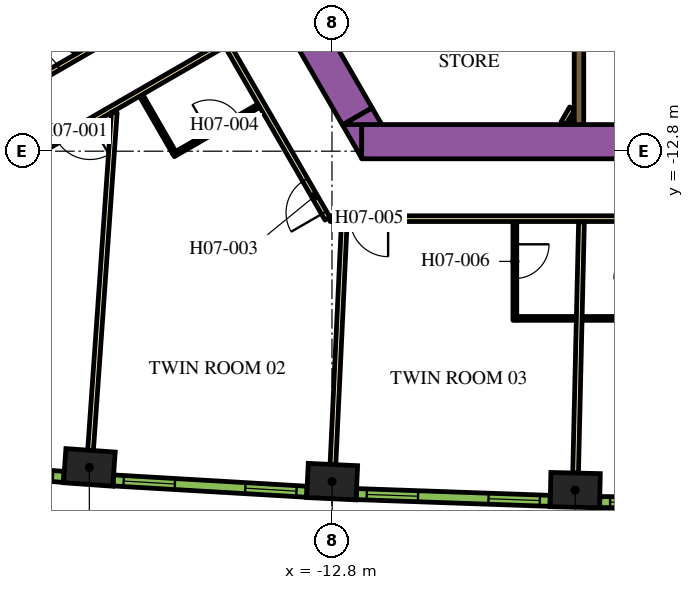
"""IFC4 building model, lengths in metres.
Left out: names, types, materials, properties, quantities, classifications, styles, units other than length and angle.
Written with IfcOpenShell. Run it as: python <this file> out.ifc"""

import sys

from ifc_helpers import new_model, si_unit, direction, frame, frame_2d, origin, origin_2d, place, context, subcontext, project, spatial, polyline, rectangle, outline, extrude, element, fill, save


model = new_model("IFC4")
c1 = context("Model", 3, precision=1e-05, world=origin(), true_north=direction((0.0, 1.0)))
c2 = subcontext(c1, "Body", "Model", "MODEL_VIEW")
j1 = project(units=[si_unit("LENGTHUNIT", "METRE"), si_unit("PLANEANGLEUNIT", "RADIAN")], contexts=[c1])
p1 = place(None, origin())
s1 = spatial("IfcSite", under=j1, at=p1, CompositionType="ELEMENT")
p2 = place(p1, origin())
s2 = spatial("IfcBuilding", under=s1, at=p2, CompositionType="ELEMENT")
p3 = place(p2, frame((0.0, 0.0, 95.4)))
s3 = spatial("IfcBuildingStorey", under=s2, at=p3, CompositionType="ELEMENT", Elevation=95.4)
for number, where, z_axis, x_axis in (
    (1, (-19.184, -21.12, 0.0), (0.0, 0.0, 1.0), (0.998, -0.07, 0.0)),
    (2, (-12.795, -21.494, 0.0), (0.0, 0.0, 1.0), (0.999, -0.047, 0.0)),
    (3, (-6.399, -21.719, 0.0), (0.0, 0.0, 1.0), (1.0, -0.023, 0.0)),
):
    element("IfcColumn", number, at=place(p3, frame(where, z_axis=z_axis, x_axis=x_axis)), inside=s3, PredefinedType="COLUMN", context=c2, shape_type="SweptSolid", body=[
        extrude(rectangle(XDim=1.3, YDim=0.9, at=origin_2d()), origin(), (0.0, 0.0, 1.0), 3.9),
    ])
p4 = place(p3, frame((-12.019, -12.55, 0.0), z_axis=(0.0, 0.0, 1.0), x_axis=(1.0, 0.0, 0.0)))
e4 = element("IfcWall", 4, at=p4, inside=s3, PredefinedType="SOLIDWALL", context=c2, shape_type="SweptSolid", body=[
    extrude(rectangle(XDim=21.63, YDim=0.9, at=frame_2d((10.815, 0.0))), origin(), (0.0, 0.0, 1.0), 3.9),
])
p5 = place(p3, origin())
e5 = element("IfcWall", 5, at=p5, inside=s3, PredefinedType="SOLIDWALL", context=c2, shape_type="SweptSolid", body=[
    extrude(outline(polyline([(-12.529, -12.1), (-12.021, -12.1), (-12.021, -12.98), (-12.529, -12.1)])), origin(), (0.0, 0.0, 1.0), 3.9),
])
p6 = place(p3, frame((-12.134, -11.883, 0.0), z_axis=(0.0, 0.0, 1.0), x_axis=(-0.500005339912, 0.866022320763, 0.0)))
e6 = element("IfcWall", 6, at=p6, inside=s3, PredefinedType="SOLIDWALL", context=c2, shape_type="SweptSolid", body=[
    extrude(rectangle(XDim=9.488, YDim=0.9, at=frame_2d((4.744, 0.0))), origin(), (0.0, 0.0, 1.0), 3.9),
])
e7 = element("IfcWall", 7, at=p5, inside=s3, PredefinedType="SOLIDWALL", context=c2, shape_type="SweptSolid", body=[
    extrude(outline(polyline([(-11.489, -12.1), (-12.505, -12.1), (-11.743, -11.66), (-11.489, -12.1)])), origin(), (0.0, 0.0, 1.0), 3.9),
])
p7 = place(p3, frame((-6.3, -12.1, 0.0), z_axis=(0.0, 0.0, 1.0), x_axis=(0.0, 1.0, 0.0)))
e8 = element("IfcWall", 8, at=p7, inside=s3, PredefinedType="SOLIDWALL", context=c2, shape_type="SweptSolid", body=[
    extrude(rectangle(XDim=3.146, YDim=0.25, at=frame_2d((1.573, 0.0))), origin(), (0.0, 0.0, 1.0), 3.9),
])
p8 = place(p3, frame((-6.708, -12.068, 0.0), z_axis=(0.0, 0.0, 1.0), x_axis=(0.500000789788, 0.8660249478, 0.0)))
e9 = element("IfcWall", 9, at=p8, inside=s3, PredefinedType="PARTITIONING", context=c2, shape_type="SweptSolid", body=[
    extrude(rectangle(XDim=0.456, YDim=0.15, at=frame_2d((0.228, 0.0))), origin(), (0.0, 0.0, 1.0), 2.75),
])
p9 = place(p3, frame((-6.534, -12.068, 0.0), z_axis=(0.0, 0.0, 1.0), x_axis=(0.500240224089, 0.865886665912, 0.0)))
e10 = element("IfcWall", 10, at=p9, inside=s3, PredefinedType="PARTITIONING", context=c2, shape_type="SweptSolid", body=[
    extrude(rectangle(XDim=0.109, YDim=0.15, at=frame_2d((0.054, 0.0))), origin(), (0.0, 0.0, 1.0), 2.75),
])
p10 = place(p3, frame((-28.211, -15.335, 0.0), z_axis=(0.0, 0.0, 1.0), x_axis=(0.866025884867, 0.49999916674, 0.0)))
e11 = element("IfcWall", 11, at=p10, inside=s3, PredefinedType="PARTITIONING", context=c2, shape_type="SweptSolid", body=[
    extrude(rectangle(XDim=13.543, YDim=0.15, at=frame_2d((6.772, 0.0))), origin(), (0.0, 0.0, 1.0), 2.75),
])
p11 = place(p10, frame((8.488, 0.0, 0.0)))
e12 = element("IfcOpeningElement", 12, at=p11, cuts=e11, PredefinedType="OPENING", context=c2, shape_type="SweptSolid", body=[
    extrude(rectangle(XDim=1.0, YDim=2.1, at=frame_2d((0.5, 1.05))), frame((0.0, 0.085, 0.0), z_axis=(0.0, -1.0, 0.0), x_axis=(1.0, 0.0, 0.0)), (0.0, 0.0, 1.0), 0.17),
])
p12 = place(p3, frame((-15.587, -9.952, 0.0), z_axis=(0.0, 0.0, 1.0), x_axis=(-0.866017869832, -0.500013048961, 0.0)))
e13 = element("IfcWall", 13, at=p12, inside=s3, PredefinedType="PARTITIONING", context=c2, shape_type="SweptSolid", body=[
    extrude(rectangle(XDim=13.624, YDim=0.15, at=frame_2d((6.812, 0.0))), origin(), (0.0, 0.0, 1.0), 2.75),
])
p13 = place(p12, frame((4.134, 0.0, 0.0)))
e14 = element("IfcOpeningElement", 14, at=p13, cuts=e13, PredefinedType="OPENING", context=c2, shape_type="SweptSolid", body=[
    extrude(rectangle(XDim=1.0, YDim=2.1, at=frame_2d((0.5, 1.05))), frame((0.0, 0.085, 0.0), z_axis=(0.0, -1.0, 0.0), x_axis=(1.0, 0.0, 0.0)), (0.0, 0.0, 1.0), 0.17),
])
p14 = place(p3, frame((-12.918, -14.575, 0.0), z_axis=(0.0, 0.0, 1.0), x_axis=(-0.500009150678, 0.866020120573, 0.0)))
e15 = element("IfcWall", 15, at=p14, inside=s3, PredefinedType="PARTITIONING", context=c2, shape_type="SweptSolid", body=[
    extrude(rectangle(XDim=5.258, YDim=0.15, at=frame_2d((2.629, 0.0))), origin(), (0.0, 0.0, 1.0), 2.75),
])
p15 = place(p14, frame((0.18, 0.0, 0.0)))
e16 = element("IfcOpeningElement", 16, at=p15, cuts=e15, PredefinedType="OPENING", context=c2, shape_type="SweptSolid", body=[
    extrude(rectangle(XDim=1.0, YDim=2.1, at=frame_2d((0.5, 1.05))), frame((0.0, 0.085, 0.0), z_axis=(0.0, -1.0, 0.0), x_axis=(1.0, 0.0, 0.0)), (0.0, 0.0, 1.0), 0.17),
])
p16 = place(p3, frame((12.918, -14.575, 0.0), z_axis=(0.0, 0.0, 1.0), x_axis=(-1.0, 0.0, 0.0)))
e17 = element("IfcWall", 17, at=p16, inside=s3, PredefinedType="PARTITIONING", context=c2, shape_type="SweptSolid", body=[
    extrude(rectangle(XDim=25.766, YDim=0.15, at=frame_2d((12.883, 0.0))), origin(), (0.0, 0.0, 1.0), 2.75),
])
p17 = place(p16, frame((24.24, 0.0, 0.0)))
e18 = element("IfcOpeningElement", 18, at=p17, cuts=e17, PredefinedType="OPENING", context=c2, shape_type="SweptSolid", body=[
    extrude(rectangle(XDim=1.0, YDim=2.1, at=frame_2d((0.5, 1.05))), frame((0.0, 0.085, 0.0), z_axis=(0.0, -1.0, 0.0), x_axis=(1.0, 0.0, 0.0)), (0.0, 0.0, 1.0), 0.17),
])
p18 = place(p16, frame((13.144, 0.0, 0.0)))
e19 = element("IfcOpeningElement", 19, at=p18, cuts=e17, PredefinedType="OPENING", context=c2, shape_type="SweptSolid", body=[
    extrude(rectangle(XDim=1.0, YDim=2.1, at=frame_2d((0.5, 1.05))), frame((0.0, 0.085, 0.0), z_axis=(0.0, -1.0, 0.0), x_axis=(1.0, 0.0, 0.0)), (0.0, 0.0, 1.0), 0.17),
])
p19 = place(p16, frame((11.693, 0.0, 0.0)))
e20 = element("IfcOpeningElement", 20, at=p19, cuts=e17, PredefinedType="OPENING", context=c2, shape_type="SweptSolid", body=[
    extrude(rectangle(XDim=1.0, YDim=2.1, at=frame_2d((0.5, 1.05))), frame((0.0, 0.085, 0.0), z_axis=(0.0, -1.0, 0.0), x_axis=(1.0, 0.0, 0.0)), (0.0, 0.0, 1.0), 0.17),
])
p20 = place(p16, frame((0.596, 0.0, 0.0)))
e21 = element("IfcOpeningElement", 21, at=p20, cuts=e17, PredefinedType="OPENING", context=c2, shape_type="SweptSolid", body=[
    extrude(rectangle(XDim=1.0, YDim=2.1, at=frame_2d((0.5, 1.05))), frame((0.0, 0.085, 0.0), z_axis=(0.0, -1.0, 0.0), x_axis=(1.0, 0.0, 0.0)), (0.0, 0.0, 1.0), 0.17),
])
p21 = place(p3, frame((-27.479, -6.251, 0.0), z_axis=(0.0, 0.0, 1.0), x_axis=(0.898945877276, -0.438059710231, 0.0)))
e22 = element("IfcWall", 22, at=p21, inside=s3, PredefinedType="PARTITIONING", context=c2, shape_type="SweptSolid", body=[
    extrude(rectangle(XDim=8.909, YDim=0.15, at=frame_2d((4.455, 0.0))), origin(), (0.0, 0.0, 1.0), 2.75),
])
p22 = place(p3, frame((-19.153, -20.671, 0.0), z_axis=(0.0, 0.0, 1.0), x_axis=(0.070070736723, 0.997542025107, 0.0)))
e23 = element("IfcWall", 23, at=p22, inside=s3, PredefinedType="PARTITIONING", context=c2, shape_type="SweptSolid", body=[
    extrude(rectangle(XDim=8.909, YDim=0.15, at=frame_2d((4.455, 0.0))), origin(), (0.0, 0.0, 1.0), 2.75),
])
p23 = place(p3, frame((-12.774, -21.045, 0.0), z_axis=(0.0, 0.0, 1.0), x_axis=(0.046750341626, 0.998906605023, 0.0)))
e24 = element("IfcWall", 24, at=p23, inside=s3, PredefinedType="PARTITIONING", context=c2, shape_type="SweptSolid", body=[
    extrude(rectangle(XDim=6.392, YDim=0.15, at=frame_2d((3.196, 0.0))), origin(), (0.0, 0.0, 1.0), 2.75),
])
p24 = place(p3, frame((-6.389, -21.269, 0.0), z_axis=(0.0, 0.0, 1.0), x_axis=(0.023377429176, 0.999726710559, 0.0)))
e25 = element("IfcWall", 25, at=p24, inside=s3, PredefinedType="PARTITIONING", context=c2, shape_type="SweptSolid", body=[
    extrude(rectangle(XDim=6.611, YDim=0.15, at=frame_2d((3.305, 0.0))), origin(), (0.0, 0.0, 1.0), 2.75),
])
p25 = place(p3, frame((-16.974, -12.9, 0.0), z_axis=(0.0, 0.0, 1.0), x_axis=(0.865997922154, 0.500047596559, 0.0)))
e26 = element("IfcWall", 26, at=p25, inside=s3, PredefinedType="PARTITIONING", context=c2, shape_type="SweptSolid", body=[
    extrude(rectangle(XDim=2.6, YDim=0.1, at=frame_2d((1.3, 0.0))), origin(), (0.0, 0.0, 1.0), 2.75),
])
p26 = place(p25, frame((1.1, 0.0, 0.0)))
e27 = element("IfcOpeningElement", 27, at=p26, cuts=e26, PredefinedType="OPENING", context=c2, shape_type="SweptSolid", body=[
    extrude(rectangle(XDim=0.9, YDim=2.1, at=frame_2d((0.45, 1.05))), frame((0.0, 0.06, 0.0), z_axis=(0.0, -1.0, 0.0), x_axis=(1.0, 0.0, 0.0)), (0.0, 0.0, 1.0), 0.12),
])
p27 = place(p3, frame((-16.956, -12.832, 0.0), z_axis=(0.0, 0.0, 1.0), x_axis=(-0.499978980201, 0.866037539231, 0.0)))
e28 = element("IfcWall", 28, at=p27, inside=s3, PredefinedType="PARTITIONING", context=c2, shape_type="SweptSolid", body=[
    extrude(rectangle(XDim=1.73, YDim=0.1, at=frame_2d((0.865, 0.0))), origin(), (0.0, 0.0, 1.0), 2.75),
])
p28 = place(p3, frame((-7.988, -14.65, 0.0), z_axis=(0.0, 0.0, 1.0), x_axis=(0.0, -1.0, 0.0)))
e29 = element("IfcWall", 29, at=p28, inside=s3, PredefinedType="PARTITIONING", context=c2, shape_type="SweptSolid", body=[
    extrude(rectangle(XDim=2.6, YDim=0.1, at=frame_2d((1.3, 0.0))), origin(), (0.0, 0.0, 1.0), 2.75),
])
p29 = place(p28, frame((0.6, 0.0, 0.0)))
e30 = element("IfcOpeningElement", 30, at=p29, cuts=e29, PredefinedType="OPENING", context=c2, shape_type="SweptSolid", body=[
    extrude(rectangle(XDim=0.9, YDim=2.1, at=frame_2d((0.45, 1.05))), frame((0.0, 0.06, 0.0), z_axis=(0.0, -1.0, 0.0), x_axis=(1.0, 0.0, 0.0)), (0.0, 0.0, 1.0), 0.12),
])
p30 = place(p3, frame((-7.938, -17.2, 0.0), z_axis=(0.0, 0.0, 1.0), x_axis=(1.0, 0.0, 0.0)))
e31 = element("IfcWall", 31, at=p30, inside=s3, PredefinedType="PARTITIONING", context=c2, shape_type="SweptSolid", body=[
    extrude(rectangle(XDim=1.56, YDim=0.1, at=frame_2d((0.78, 0.0))), origin(), (0.0, 0.0, 1.0), 2.75),
])
p31 = place(p3, frame((-4.53, -17.2, 0.0), z_axis=(0.0, 0.0, 1.0), x_axis=(-1.0, 0.0, 0.0)))
e32 = element("IfcWall", 32, at=p31, inside=s3, PredefinedType="PARTITIONING", context=c2, shape_type="SweptSolid", body=[
    extrude(rectangle(XDim=1.68, YDim=0.1, at=frame_2d((0.84, 0.0))), origin(), (0.0, 0.0, 1.0), 2.75),
])
p32 = place(p3, frame((-24.946, -20.954, 0.0), z_axis=(0.0, 0.0, 1.0), x_axis=(0.99665273362, -0.081751627308, 0.0)))
e33 = element("IfcWall", 33, at=p32, inside=s3, PredefinedType="SOLIDWALL", context=c2, shape_type="SweptSolid", body=[
    extrude(rectangle(XDim=5.107, YDim=0.29, at=frame_2d((2.553, 0.0))), origin(), (0.0, 0.0, 1.0), 3.65),
])
p33 = place(p32, frame((0.24, 0.0, 0.9)))
e34 = element("IfcOpeningElement", 34, at=p33, cuts=e33, PredefinedType="OPENING", context=c2, shape_type="SweptSolid", body=[
    extrude(rectangle(XDim=1.35, YDim=2.15, at=frame_2d((0.675, 1.075))), frame((0.0, 0.155, 0.0), z_axis=(0.0, -1.0, 0.0), x_axis=(1.0, 0.0, 0.0)), (0.0, 0.0, 1.0), 0.31),
])
p34 = place(p32, frame((3.471, 0.0, 0.9)))
e35 = element("IfcOpeningElement", 35, at=p34, cuts=e33, PredefinedType="OPENING", context=c2, shape_type="SweptSolid", body=[
    extrude(rectangle(XDim=1.35, YDim=2.15, at=frame_2d((0.675, 1.075))), frame((0.0, 0.155, 0.0), z_axis=(0.0, -1.0, 0.0), x_axis=(1.0, 0.0, 0.0)), (0.0, 0.0, 1.0), 0.31),
])
p35 = place(p3, frame((-18.553, -21.463, 0.0), z_axis=(0.0, 0.0, 1.0), x_axis=(0.998290511436, -0.058447025388, 0.0)))
e36 = element("IfcWall", 36, at=p35, inside=s3, PredefinedType="SOLIDWALL", context=c2, shape_type="SweptSolid", body=[
    extrude(rectangle(XDim=5.1, YDim=0.29, at=frame_2d((2.55, 0.0))), origin(), (0.0, 0.0, 1.0), 3.65),
])
p36 = place(p35, frame((0.273, 0.0, 0.9)))
e37 = element("IfcOpeningElement", 37, at=p36, cuts=e36, PredefinedType="OPENING", context=c2, shape_type="SweptSolid", body=[
    extrude(rectangle(XDim=1.35, YDim=2.15, at=frame_2d((0.675, 1.075))), frame((0.0, 0.155, 0.0), z_axis=(0.0, -1.0, 0.0), x_axis=(1.0, 0.0, 0.0)), (0.0, 0.0, 1.0), 0.31),
])
p37 = place(p35, frame((3.478, 0.0, 0.9)))
e38 = element("IfcOpeningElement", 38, at=p37, cuts=e36, PredefinedType="OPENING", context=c2, shape_type="SweptSolid", body=[
    extrude(rectangle(XDim=1.35, YDim=2.15, at=frame_2d((0.675, 1.075))), frame((0.0, 0.155, 0.0), z_axis=(0.0, -1.0, 0.0), x_axis=(1.0, 0.0, 0.0)), (0.0, 0.0, 1.0), 0.31),
])
p38 = place(p3, frame((-12.157, -21.822, 0.0), z_axis=(0.0, 0.0, 1.0), x_axis=(0.999385993957, -0.035037623812, 0.0)))
e39 = element("IfcWall", 39, at=p38, inside=s3, PredefinedType="SOLIDWALL", context=c2, shape_type="SweptSolid", body=[
    extrude(rectangle(XDim=5.101, YDim=0.29, at=frame_2d((2.55, 0.0))), origin(), (0.0, 0.0, 1.0), 3.65),
])
p39 = place(p38, frame((0.273, 0.0, 0.9)))
e40 = element("IfcOpeningElement", 40, at=p39, cuts=e39, PredefinedType="OPENING", context=c2, shape_type="SweptSolid", body=[
    extrude(rectangle(XDim=1.35, YDim=2.15, at=frame_2d((0.675, 1.075))), frame((0.0, 0.155, 0.0), z_axis=(0.0, -1.0, 0.0), x_axis=(1.0, 0.0, 0.0)), (0.0, 0.0, 1.0), 0.31),
])
p40 = place(p38, frame((3.478, 0.0, 0.9)))
e41 = element("IfcOpeningElement", 41, at=p40, cuts=e39, PredefinedType="OPENING", context=c2, shape_type="SweptSolid", body=[
    extrude(rectangle(XDim=1.35, YDim=2.15, at=frame_2d((0.675, 1.075))), frame((0.0, 0.155, 0.0), z_axis=(0.0, -1.0, 0.0), x_axis=(1.0, 0.0, 0.0)), (0.0, 0.0, 1.0), 0.31),
])
p41 = place(p3, frame((-5.753, -22.031, 0.0), z_axis=(0.0, 0.0, 1.0), x_axis=(0.999931786565, -0.011679992145, 0.0)))
e42 = element("IfcWall", 42, at=p41, inside=s3, PredefinedType="SOLIDWALL", context=c2, shape_type="SweptSolid", body=[
    extrude(rectangle(XDim=5.1, YDim=0.29, at=frame_2d((2.55, 0.0))), origin(), (0.0, 0.0, 1.0), 3.65),
])
p42 = place(p41, frame((0.272, 0.0, 0.9)))
e43 = element("IfcOpeningElement", 43, at=p42, cuts=e42, PredefinedType="OPENING", context=c2, shape_type="SweptSolid", body=[
    extrude(rectangle(XDim=1.35, YDim=2.15, at=frame_2d((0.675, 1.075))), frame((0.0, 0.155, 0.0), z_axis=(0.0, -1.0, 0.0), x_axis=(1.0, 0.0, 0.0)), (0.0, 0.0, 1.0), 0.31),
])
p43 = place(p41, frame((3.478, 0.0, 0.9)))
e44 = element("IfcOpeningElement", 44, at=p43, cuts=e42, PredefinedType="OPENING", context=c2, shape_type="SweptSolid", body=[
    extrude(rectangle(XDim=1.35, YDim=2.15, at=frame_2d((0.675, 1.075))), frame((0.0, 0.155, 0.0), z_axis=(0.0, -1.0, 0.0), x_axis=(1.0, 0.0, 0.0)), (0.0, 0.0, 1.0), 0.31),
])
p44 = place(p13, origin())
e45 = element("IfcDoor", 45, at=p44, inside=s3, OperationType="SINGLE_SWING_LEFT", PredefinedType="DOOR", context=c2, shape_type="SweptSolid", body=[
    extrude(rectangle(XDim=1.0, YDim=2.1, at=frame_2d((0.5, 1.05))), frame((0.0, 0.025, 0.0), z_axis=(0.0, -1.0, 0.0), x_axis=(1.0, 0.0, 0.0)), (0.0, 0.0, 1.0), 0.05),
])
fill(e14, e45)
p45 = place(p15, origin())
e46 = element("IfcDoor", 46, at=p45, inside=s3, OperationType="SINGLE_SWING_LEFT", PredefinedType="DOOR", context=c2, shape_type="SweptSolid", body=[
    extrude(rectangle(XDim=1.0, YDim=2.1, at=frame_2d((0.5, 1.05))), frame((0.0, 0.025, 0.0), z_axis=(0.0, -1.0, 0.0), x_axis=(1.0, 0.0, 0.0)), (0.0, 0.0, 1.0), 0.05),
])
fill(e16, e46)
p46 = place(p26, origin())
e47 = element("IfcDoor", 47, at=p46, inside=s3, OperationType="SINGLE_SWING_LEFT", PredefinedType="DOOR", context=c2, shape_type="SweptSolid", body=[
    extrude(rectangle(XDim=0.9, YDim=2.1, at=frame_2d((0.45, 1.05))), frame((0.0, 0.025, 0.0), z_axis=(0.0, -1.0, 0.0), x_axis=(1.0, 0.0, 0.0)), (0.0, 0.0, 1.0), 0.05),
])
fill(e27, e47)
p47 = place(p17, origin())
e48 = element("IfcDoor", 48, at=p47, inside=s3, OperationType="SINGLE_SWING_RIGHT", PredefinedType="DOOR", context=c2, shape_type="SweptSolid", body=[
    extrude(rectangle(XDim=1.0, YDim=2.1, at=frame_2d((0.5, 1.05))), frame((0.0, 0.025, 0.0), z_axis=(0.0, -1.0, 0.0), x_axis=(1.0, 0.0, 0.0)), (0.0, 0.0, 1.0), 0.05),
])
fill(e18, e48)
p48 = place(p29, origin())
e49 = element("IfcDoor", 49, at=p48, inside=s3, OperationType="SINGLE_SWING_RIGHT", PredefinedType="DOOR", context=c2, shape_type="SweptSolid", body=[
    extrude(rectangle(XDim=0.9, YDim=2.1, at=frame_2d((0.45, 1.05))), frame((0.0, 0.025, 0.0), z_axis=(0.0, -1.0, 0.0), x_axis=(1.0, 0.0, 0.0)), (0.0, 0.0, 1.0), 0.05),
])
fill(e30, e49)
p49 = place(p11, origin())
e50 = element("IfcDoor", 50, at=p49, inside=s3, OperationType="SINGLE_SWING_RIGHT", PredefinedType="DOOR", context=c2, shape_type="SweptSolid", body=[
    extrude(rectangle(XDim=1.0, YDim=2.1, at=frame_2d((0.5, 1.05))), frame((0.0, 0.025, 0.0), z_axis=(0.0, -1.0, 0.0), x_axis=(1.0, 0.0, 0.0)), (0.0, 0.0, 1.0), 0.05),
])
fill(e12, e50)
p50 = place(p34, origin())
e51 = element("IfcWindow", 51, at=p50, inside=s3, PartitioningType="DOUBLE_PANEL_VERTICAL", PredefinedType="WINDOW", context=c2, shape_type="SweptSolid", body=[
    extrude(rectangle(XDim=1.35, YDim=2.15, at=frame_2d((0.675, 1.075))), frame((0.0, 0.015, 0.0), z_axis=(0.0, -1.0, 0.0), x_axis=(1.0, 0.0, 0.0)), (0.0, 0.0, 1.0), 0.06),
])
fill(e35, e51)
p51 = place(p36, origin())
e52 = element("IfcWindow", 52, at=p51, inside=s3, PartitioningType="DOUBLE_PANEL_VERTICAL", PredefinedType="WINDOW", context=c2, shape_type="SweptSolid", body=[
    extrude(rectangle(XDim=1.35, YDim=2.15, at=frame_2d((0.675, 1.075))), frame((0.0, 0.015, 0.0), z_axis=(0.0, -1.0, 0.0), x_axis=(1.0, 0.0, 0.0)), (0.0, 0.0, 1.0), 0.06),
])
fill(e37, e52)
p52 = place(p37, origin())
e53 = element("IfcWindow", 53, at=p52, inside=s3, PartitioningType="DOUBLE_PANEL_VERTICAL", PredefinedType="WINDOW", context=c2, shape_type="SweptSolid", body=[
    extrude(rectangle(XDim=1.35, YDim=2.15, at=frame_2d((0.675, 1.075))), frame((0.0, 0.015, 0.0), z_axis=(0.0, -1.0, 0.0), x_axis=(1.0, 0.0, 0.0)), (0.0, 0.0, 1.0), 0.06),
])
fill(e38, e53)
p53 = place(p39, origin())
e54 = element("IfcWindow", 54, at=p53, inside=s3, PartitioningType="DOUBLE_PANEL_VERTICAL", PredefinedType="WINDOW", context=c2, shape_type="SweptSolid", body=[
    extrude(rectangle(XDim=1.35, YDim=2.15, at=frame_2d((0.675, 1.075))), frame((0.0, 0.015, 0.0), z_axis=(0.0, -1.0, 0.0), x_axis=(1.0, 0.0, 0.0)), (0.0, 0.0, 1.0), 0.06),
])
fill(e40, e54)
p54 = place(p40, origin())
e55 = element("IfcWindow", 55, at=p54, inside=s3, PartitioningType="DOUBLE_PANEL_VERTICAL", PredefinedType="WINDOW", context=c2, shape_type="SweptSolid", body=[
    extrude(rectangle(XDim=1.35, YDim=2.15, at=frame_2d((0.675, 1.075))), frame((0.0, 0.015, 0.0), z_axis=(0.0, -1.0, 0.0), x_axis=(1.0, 0.0, 0.0)), (0.0, 0.0, 1.0), 0.06),
])
fill(e41, e55)
p55 = place(p42, origin())
e56 = element("IfcWindow", 56, at=p55, inside=s3, PartitioningType="DOUBLE_PANEL_VERTICAL", PredefinedType="WINDOW", context=c2, shape_type="SweptSolid", body=[
    extrude(rectangle(XDim=1.35, YDim=2.15, at=frame_2d((0.675, 1.075))), frame((0.0, 0.015, 0.0), z_axis=(0.0, -1.0, 0.0), x_axis=(1.0, 0.0, 0.0)), (0.0, 0.0, 1.0), 0.06),
])
fill(e43, e56)
save(model, sys.argv[1])
